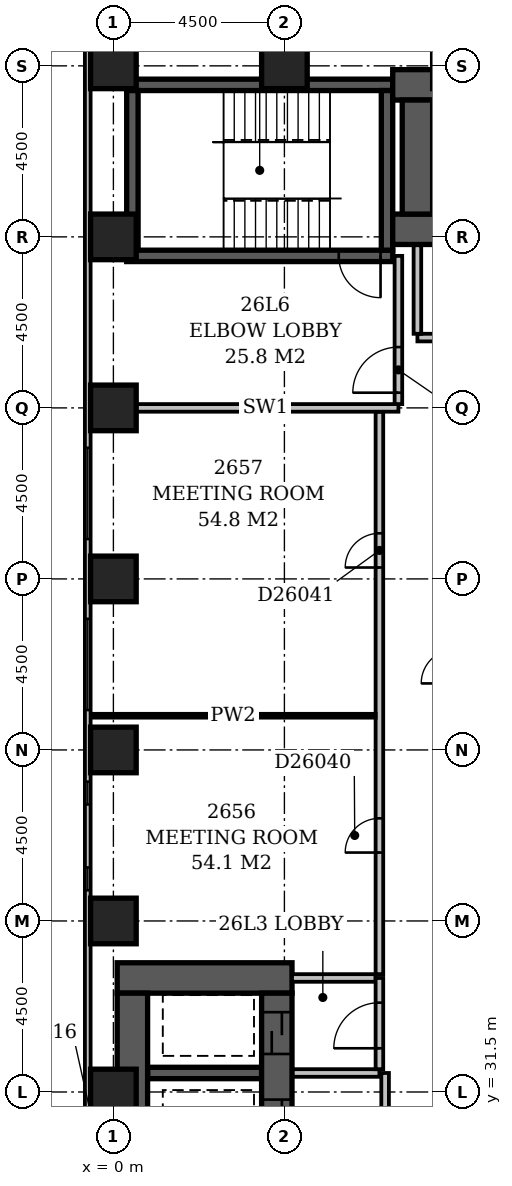
"""IFC4 building model, lengths in metres.
Left out: names, types, materials, properties, quantities, classifications, styles, units other than length and angle.
Written with IfcOpenShell. Run it as: python <this file> out.ifc"""

import sys

from ifc_helpers import new_model, si_unit, direction, frame, frame_2d, origin, origin_2d, place, context, subcontext, project, spatial, rectangle, extrude, element, fill, save


model = new_model("IFC4")
c1 = context("Model", 3, precision=1e-05, world=origin(), true_north=direction((0.0, 1.0)))
c2 = subcontext(c1, "Body", "Model", "MODEL_VIEW")
j1 = project(units=[si_unit("LENGTHUNIT", "METRE"), si_unit("PLANEANGLEUNIT", "RADIAN")], contexts=[c1])
p1 = place(None, origin())
s1 = spatial("IfcSite", under=j1, at=p1, CompositionType="ELEMENT")
p2 = place(p1, origin())
s2 = spatial("IfcBuilding", under=s1, at=p2, CompositionType="ELEMENT")
p3 = place(p2, frame((0.0, 0.0, 104.6)))
s3 = spatial("IfcBuildingStorey", under=s2, at=p3, CompositionType="ELEMENT", Elevation=104.6)
p4 = place(p3, frame((0.1, 34.5, -0.3), z_axis=(0.0, 0.0, 1.0), x_axis=(1.0, 0.0, 0.0)))
e1 = element("IfcWall", 1, at=p4, inside=s3, PredefinedType="SHEAR", context=c2, shape_type="SweptSolid", body=[
    extrude(rectangle(XDim=4.6, YDim=0.8, at=frame_2d((2.3, 0.0))), origin(), (0.0, 0.0, 1.0), 3.45),
])
p5 = place(p3, frame((0.35, 53.5, -0.3), z_axis=(0.0, 0.0, 1.0), x_axis=(1.0, 0.0, 0.0)))
e2 = element("IfcWall", 2, at=p5, inside=s3, PredefinedType="SHEAR", context=c2, shape_type="SweptSolid", body=[
    extrude(rectangle(XDim=7.0, YDim=0.3, at=frame_2d((3.5, 0.0))), origin(), (0.0, 0.0, 1.0), 3.45),
])
p6 = place(p5, frame((5.58, 0.0, 0.3)))
e3 = element("IfcOpeningElement", 3, at=p6, cuts=e2, PredefinedType="OPENING", context=c2, shape_type="SweptSolid", body=[
    extrude(rectangle(XDim=1.1, YDim=2.1, at=frame_2d((0.55, 1.05))), frame((0.0, 0.162, 0.0), z_axis=(0.0, -1.0, 0.0), x_axis=(1.0, 0.0, 0.0)), (0.0, 0.0, 1.0), 0.324),
])
p7 = place(p3, frame((0.35, 58.0, -0.3), z_axis=(0.0, 0.0, 1.0), x_axis=(1.0, 0.0, 0.0)))
e4 = element("IfcWall", 4, at=p7, inside=s3, PredefinedType="SHEAR", context=c2, shape_type="SweptSolid", body=[
    extrude(rectangle(XDim=7.0, YDim=0.3, at=frame_2d((3.5, 0.0))), origin(), (0.0, 0.0, 1.0), 3.45),
])
p8 = place(p3, frame((0.5, 27.15, -0.3), z_axis=(0.0, 0.0, 1.0), x_axis=(0.0, 1.0, 0.0)))
e5 = element("IfcWall", 5, at=p8, inside=s3, PredefinedType="SHEAR", context=c2, shape_type="SweptSolid", body=[
    extrude(rectangle(XDim=6.95, YDim=0.8, at=frame_2d((3.475, 0.0))), origin(), (0.0, 0.0, 1.0), 3.45),
])
p9 = place(p3, frame((0.5, 53.65, -0.3), z_axis=(0.0, 0.0, 1.0), x_axis=(0.0, 1.0, 0.0)))
e6 = element("IfcWall", 6, at=p9, inside=s3, PredefinedType="SHEAR", context=c2, shape_type="SweptSolid", body=[
    extrude(rectangle(XDim=4.2, YDim=0.3, at=frame_2d((2.1, 0.0))), origin(), (0.0, 0.0, 1.0), 3.45),
])
p10 = place(p3, frame((0.9, 32.0, -0.3), z_axis=(0.0, 0.0, 1.0), x_axis=(1.0, 0.0, 0.0)))
e7 = element("IfcWall", 7, at=p10, inside=s3, PredefinedType="SHEAR", context=c2, shape_type="SweptSolid", body=[
    extrude(rectangle(XDim=3.0, YDim=0.3, at=frame_2d((1.5, 0.0))), origin(), (0.0, 0.0, 1.0), 3.45),
])
p11 = place(p3, frame((4.3, 27.15, -0.3), z_axis=(0.0, 0.0, 1.0), x_axis=(0.0, 1.0, 0.0)))
e8 = element("IfcWall", 8, at=p11, inside=s3, PredefinedType="SHEAR", context=c2, shape_type="SweptSolid", body=[
    extrude(rectangle(XDim=6.95, YDim=0.8, at=frame_2d((3.475, 0.0))), origin(), (0.0, 0.0, 1.0), 3.45),
])
p12 = place(p11, frame((3.05, 0.0, 0.3)))
e9 = element("IfcOpeningElement", 9, at=p12, cuts=e8, PredefinedType="OPENING", context=c2, shape_type="SweptSolid", body=[
    extrude(rectangle(XDim=1.1, YDim=2.1, at=frame_2d((0.55, 1.05))), frame((0.0, 0.412, 0.0), z_axis=(0.0, -1.0, 0.0), x_axis=(1.0, 0.0, 0.0)), (0.0, 0.0, 1.0), 0.824),
])
p13 = place(p11, frame((0.55, 0.0, 0.3)))
e10 = element("IfcOpeningElement", 10, at=p13, cuts=e8, PredefinedType="OPENING", context=c2, shape_type="SweptSolid", body=[
    extrude(rectangle(XDim=1.1, YDim=2.1, at=frame_2d((0.55, 1.05))), frame((0.0, 0.412, 0.0), z_axis=(0.0, -1.0, 0.0), x_axis=(1.0, 0.0, 0.0)), (0.0, 0.0, 1.0), 0.824),
])
p14 = place(p11, frame((5.35, 0.0, 0.3)))
e11 = element("IfcOpeningElement", 11, at=p14, cuts=e8, PredefinedType="OPENING", context=c2, shape_type="SweptSolid", body=[
    extrude(rectangle(XDim=1.1, YDim=2.1, at=frame_2d((0.55, 1.05))), frame((0.0, 0.412, 0.0), z_axis=(0.0, -1.0, 0.0), x_axis=(1.0, 0.0, 0.0)), (0.0, 0.0, 1.0), 0.824),
])
p15 = place(p3, frame((7.2, 53.65, -0.3), z_axis=(0.0, 0.0, 1.0), x_axis=(0.0, 1.0, 0.0)))
e12 = element("IfcWall", 12, at=p15, inside=s3, PredefinedType="SHEAR", context=c2, shape_type="SweptSolid", body=[
    extrude(rectangle(XDim=4.2, YDim=0.3, at=frame_2d((2.1, 0.0))), origin(), (0.0, 0.0, 1.0), 3.45),
])
p16 = place(p3, frame((7.35, 54.2, -0.3), z_axis=(0.0, 0.0, 1.0), x_axis=(1.0, 0.0, 0.0)))
e13 = element("IfcWall", 13, at=p16, inside=s3, PredefinedType="SHEAR", context=c2, shape_type="SweptSolid", body=[
    extrude(rectangle(XDim=16.45, YDim=0.8, at=frame_2d((8.225, 0.0))), origin(), (0.0, 0.0, 1.0), 3.45),
])
p17 = place(p16, frame((1.35, 0.0, 0.3)))
e14 = element("IfcOpeningElement", 14, at=p17, cuts=e13, PredefinedType="OPENING", context=c2, shape_type="SweptSolid", body=[
    extrude(rectangle(XDim=1.1, YDim=2.1, at=frame_2d((0.55, 1.05))), frame((0.0, 0.412, 0.0), z_axis=(0.0, -1.0, 0.0), x_axis=(1.0, 0.0, 0.0)), (0.0, 0.0, 1.0), 0.824),
])
p18 = place(p16, frame((3.85, 0.0, 0.3)))
e15 = element("IfcOpeningElement", 15, at=p18, cuts=e13, PredefinedType="OPENING", context=c2, shape_type="SweptSolid", body=[
    extrude(rectangle(XDim=1.1, YDim=2.1, at=frame_2d((0.55, 1.05))), frame((0.0, 0.412, 0.0), z_axis=(0.0, -1.0, 0.0), x_axis=(1.0, 0.0, 0.0)), (0.0, 0.0, 1.0), 0.824),
])
p19 = place(p16, frame((6.35, 0.0, 0.3)))
e16 = element("IfcOpeningElement", 16, at=p19, cuts=e13, PredefinedType="OPENING", context=c2, shape_type="SweptSolid", body=[
    extrude(rectangle(XDim=1.1, YDim=2.1, at=frame_2d((0.55, 1.05))), frame((0.0, 0.412, 0.0), z_axis=(0.0, -1.0, 0.0), x_axis=(1.0, 0.0, 0.0)), (0.0, 0.0, 1.0), 0.824),
])
p20 = place(p16, frame((8.85, 0.0, 0.3)))
e17 = element("IfcOpeningElement", 17, at=p20, cuts=e13, PredefinedType="OPENING", context=c2, shape_type="SweptSolid", body=[
    extrude(rectangle(XDim=1.1, YDim=2.1, at=frame_2d((0.55, 1.05))), frame((0.0, 0.412, 0.0), z_axis=(0.0, -1.0, 0.0), x_axis=(1.0, 0.0, 0.0)), (0.0, 0.0, 1.0), 0.824),
])
p21 = place(p16, frame((11.35, 0.0, 0.3)))
e18 = element("IfcOpeningElement", 18, at=p21, cuts=e13, PredefinedType="OPENING", context=c2, shape_type="SweptSolid", body=[
    extrude(rectangle(XDim=1.1, YDim=2.1, at=frame_2d((0.55, 1.05))), frame((0.0, 0.412, 0.0), z_axis=(0.0, -1.0, 0.0), x_axis=(1.0, 0.0, 0.0)), (0.0, 0.0, 1.0), 0.824),
])
p22 = place(p16, frame((13.85, 0.0, 0.3)))
e19 = element("IfcOpeningElement", 19, at=p22, cuts=e13, PredefinedType="OPENING", context=c2, shape_type="SweptSolid", body=[
    extrude(rectangle(XDim=1.1, YDim=2.1, at=frame_2d((0.55, 1.05))), frame((0.0, 0.412, 0.0), z_axis=(0.0, -1.0, 0.0), x_axis=(1.0, 0.0, 0.0)), (0.0, 0.0, 1.0), 0.824),
])
p23 = place(p3, frame((7.35, 58.0, -0.3), z_axis=(0.0, 0.0, 1.0), x_axis=(1.0, 0.0, 0.0)))
e20 = element("IfcWall", 20, at=p23, inside=s3, PredefinedType="SHEAR", context=c2, shape_type="SweptSolid", body=[
    extrude(rectangle(XDim=16.45, YDim=0.8, at=frame_2d((8.225, 0.0))), origin(), (0.0, 0.0, 1.0), 3.45),
])
p24 = place(p3, frame((8.0, 54.6, -0.3), z_axis=(0.0, 0.0, 1.0), x_axis=(0.0, 1.0, 0.0)))
e21 = element("IfcWall", 21, at=p24, inside=s3, PredefinedType="SHEAR", context=c2, shape_type="SweptSolid", body=[
    extrude(rectangle(XDim=3.0, YDim=0.8, at=frame_2d((1.5, 0.0))), origin(), (0.0, 0.0, 1.0), 3.45),
])
for number, where, z_axis, x_axis in (
    (22, (0.0, 31.5, -0.3), (0.0, 0.0, 1.0), (1.0, 0.0, 0.0)),
    (23, (0.0, 36.0, -0.3), (0.0, 0.0, 1.0), (1.0, 0.0, 0.0)),
    (24, (0.0, 40.5, -0.3), (0.0, 0.0, 1.0), (1.0, 0.0, 0.0)),
    (25, (0.0, 45.0, -0.3), (0.0, 0.0, 1.0), (1.0, 0.0, 0.0)),
    (26, (0.0, 49.5, -0.3), (0.0, 0.0, 1.0), (1.0, 0.0, 0.0)),
    (27, (0.0, 54.0, -0.3), (0.0, 0.0, 1.0), (1.0, 0.0, 0.0)),
    (28, (0.0, 58.5, -0.3), (0.0, 0.0, 1.0), (1.0, 0.0, 0.0)),
    (29, (4.5, 58.5, -0.3), (0.0, 0.0, 1.0), (1.0, 0.0, 0.0)),
):
    element("IfcColumn", number, at=place(p3, frame(where, z_axis=z_axis, x_axis=x_axis)), inside=s3, PredefinedType="COLUMN", context=c2, shape_type="SweptSolid", body=[
        extrude(rectangle(XDim=1.2, YDim=1.2, at=origin_2d()), origin(), (0.0, 0.0, 1.0), 3.45),
    ])
p25 = place(p3, frame((-0.675, 59.1, 0.0), z_axis=(0.0, 0.0, 1.0), x_axis=(0.0, -1.0, 0.0)))
e30 = element("IfcWall", 30, at=p25, inside=s3, PredefinedType="STANDARD", context=c2, shape_type="SweptSolid", body=[
    extrude(rectangle(XDim=55.35, YDim=0.15, at=frame_2d((27.675, 0.0))), origin(), (0.0, 0.0, 1.0), 2.5),
])
p26 = place(p25, frame((10.65, 0.0, 0.6)))
e31 = element("IfcOpeningElement", 31, at=p26, cuts=e30, PredefinedType="OPENING", context=c2, shape_type="SweptSolid", body=[
    extrude(rectangle(XDim=2.4, YDim=1.8, at=frame_2d((1.2, 0.9))), frame((0.0, 0.087, 0.0), z_axis=(0.0, -1.0, 0.0), x_axis=(1.0, 0.0, 0.0)), (0.0, 0.0, 1.0), 0.174),
])
p27 = place(p25, frame((15.15, 0.0, 0.6)))
e32 = element("IfcOpeningElement", 32, at=p27, cuts=e30, PredefinedType="OPENING", context=c2, shape_type="SweptSolid", body=[
    extrude(rectangle(XDim=2.4, YDim=1.8, at=frame_2d((1.2, 0.9))), frame((0.0, 0.087, 0.0), z_axis=(0.0, -1.0, 0.0), x_axis=(1.0, 0.0, 0.0)), (0.0, 0.0, 1.0), 0.174),
])
p28 = place(p25, frame((19.434, 0.0, 0.6)))
e33 = element("IfcOpeningElement", 33, at=p28, cuts=e30, PredefinedType="OPENING", context=c2, shape_type="SweptSolid", body=[
    extrude(rectangle(XDim=0.6, YDim=1.8, at=frame_2d((0.3, 0.9))), frame((0.0, 0.087, 0.0), z_axis=(0.0, -1.0, 0.0), x_axis=(1.0, 0.0, 0.0)), (0.0, 0.0, 1.0), 0.174),
])
p29 = place(p25, frame((21.692, 0.0, 0.6)))
e34 = element("IfcOpeningElement", 34, at=p29, cuts=e30, PredefinedType="OPENING", context=c2, shape_type="SweptSolid", body=[
    extrude(rectangle(XDim=0.6, YDim=1.8, at=frame_2d((0.3, 0.9))), frame((0.0, 0.087, 0.0), z_axis=(0.0, -1.0, 0.0), x_axis=(1.0, 0.0, 0.0)), (0.0, 0.0, 1.0), 0.174),
])
p30 = place(p3, frame((8.0, 51.35, 0.0), z_axis=(0.0, 0.0, 1.0), x_axis=(1.0, 0.0, 0.0)))
e35 = element("IfcWall", 35, at=p30, inside=s3, PredefinedType="PARTITIONING", context=c2, shape_type="SweptSolid", body=[
    extrude(rectangle(XDim=15.0, YDim=0.2, at=frame_2d((7.5, 0.0))), origin(), (0.0, 0.0, 1.0), 3.15),
])
p31 = place(p30, frame((3.4, 0.0, 0.0)))
e36 = element("IfcOpeningElement", 36, at=p31, cuts=e35, PredefinedType="OPENING", context=c2, shape_type="SweptSolid", body=[
    extrude(rectangle(XDim=1.2, YDim=2.1, at=frame_2d((0.6, 1.05))), frame((0.0, 0.112, 0.0), z_axis=(0.0, -1.0, 0.0), x_axis=(1.0, 0.0, 0.0)), (0.0, 0.0, 1.0), 0.224),
])
p32 = place(p30, frame((9.4, 0.0, 0.0)))
e37 = element("IfcOpeningElement", 37, at=p32, cuts=e35, PredefinedType="OPENING", context=c2, shape_type="SweptSolid", body=[
    extrude(rectangle(XDim=1.2, YDim=2.1, at=frame_2d((0.6, 1.05))), frame((0.0, 0.112, 0.0), z_axis=(0.0, -1.0, 0.0), x_axis=(1.0, 0.0, 0.0)), (0.0, 0.0, 1.0), 0.224),
])
p33 = place(p3, frame((8.0, 51.45, 0.0), z_axis=(0.0, 0.0, 1.0), x_axis=(0.0, 1.0, 0.0)))
e38 = element("IfcWall", 38, at=p33, inside=s3, PredefinedType="PARTITIONING", context=c2, shape_type="SweptSolid", body=[
    extrude(rectangle(XDim=2.33, YDim=0.2, at=frame_2d((1.165, 0.0))), origin(), (0.0, 0.0, 1.0), 3.15),
])
p34 = place(p3, frame((4.72, 32.0, 0.0), z_axis=(0.0, 0.0, 1.0), x_axis=(1.0, 0.0, 0.0)))
e39 = element("IfcWall", 39, at=p34, inside=s3, PredefinedType="PARTITIONING", context=c2, shape_type="SweptSolid", body=[
    extrude(rectangle(XDim=2.28, YDim=0.2, at=frame_2d((1.14, 0.0))), origin(), (0.0, 0.0, 1.0), 3.15),
])
p35 = place(p3, frame((7.0, 32.1, 0.0), z_axis=(0.0, 0.0, 1.0), x_axis=(0.0, 1.0, 0.0)))
e40 = element("IfcWall", 40, at=p35, inside=s3, PredefinedType="PARTITIONING", context=c2, shape_type="SweptSolid", body=[
    extrude(rectangle(XDim=2.4, YDim=0.2, at=frame_2d((1.2, 0.0))), origin(), (0.0, 0.0, 1.0), 3.15),
])
p36 = place(p35, frame((0.55, 0.0, 0.0)))
e41 = element("IfcOpeningElement", 41, at=p36, cuts=e40, PredefinedType="OPENING", context=c2, shape_type="SweptSolid", body=[
    extrude(rectangle(XDim=1.2, YDim=2.1, at=frame_2d((0.6, 1.05))), frame((0.0, 0.112, 0.0), z_axis=(0.0, -1.0, 0.0), x_axis=(1.0, 0.0, 0.0)), (0.0, 0.0, 1.0), 0.224),
])
p37 = place(p3, frame((4.7, 34.5, 0.0), z_axis=(0.0, 0.0, 1.0), x_axis=(1.0, 0.0, 0.0)))
e42 = element("IfcWall", 42, at=p37, inside=s3, PredefinedType="PARTITIONING", context=c2, shape_type="SweptSolid", body=[
    extrude(rectangle(XDim=2.2, YDim=0.2, at=frame_2d((1.1, 0.0))), origin(), (0.0, 0.0, 1.0), 3.15),
])
p38 = place(p3, frame((7.15, 27.17, 0.0), z_axis=(0.0, 0.0, 1.0), x_axis=(0.0, 1.0, 0.0)))
e43 = element("IfcWall", 43, at=p38, inside=s3, PredefinedType="PARTITIONING", context=c2, shape_type="SweptSolid", body=[
    extrude(rectangle(XDim=4.83, YDim=0.2, at=frame_2d((2.415, 0.0))), origin(), (0.0, 0.0, 1.0), 3.15),
])
p39 = place(p38, frame((1.73, 0.0, 0.0)))
e44 = element("IfcOpeningElement", 44, at=p39, cuts=e43, PredefinedType="OPENING", context=c2, shape_type="SweptSolid", body=[
    extrude(rectangle(XDim=1.2, YDim=2.1, at=frame_2d((0.6, 1.05))), frame((0.0, 0.112, 0.0), z_axis=(0.0, -1.0, 0.0), x_axis=(1.0, 0.0, 0.0)), (0.0, 0.0, 1.0), 0.224),
])
p40 = place(p3, frame((0.5, 49.5, 0.0), z_axis=(0.0, 0.0, 1.0), x_axis=(1.0, 0.0, 0.0)))
e45 = element("IfcWall", 45, at=p40, inside=s3, PredefinedType="PARTITIONING", context=c2, shape_type="SweptSolid", body=[
    extrude(rectangle(XDim=7.0, YDim=0.2, at=frame_2d((3.5, 0.0))), origin(), (0.0, 0.0, 1.0), 3.15),
])
p41 = place(p3, frame((7.5, 49.6, 0.0), z_axis=(0.0, 0.0, 1.0), x_axis=(0.0, 1.0, 0.0)))
e46 = element("IfcWall", 46, at=p41, inside=s3, PredefinedType="PARTITIONING", context=c2, shape_type="SweptSolid", body=[
    extrude(rectangle(XDim=3.9, YDim=0.2, at=frame_2d((1.95, 0.0))), origin(), (0.0, 0.0, 1.0), 3.15),
])
p42 = place(p41, frame((0.3, 0.0, 0.0)))
e47 = element("IfcOpeningElement", 47, at=p42, cuts=e46, PredefinedType="OPENING", context=c2, shape_type="SweptSolid", body=[
    extrude(rectangle(XDim=1.2, YDim=2.1, at=frame_2d((0.6, 1.05))), frame((0.0, 0.112, 0.0), z_axis=(0.0, -1.0, 0.0), x_axis=(1.0, 0.0, 0.0)), (0.0, 0.0, 1.0), 0.224),
])
p43 = place(p3, frame((7.0, 34.6, 0.0), z_axis=(0.0, 0.0, 1.0), x_axis=(0.0, 1.0, 0.0)))
e48 = element("IfcWall", 48, at=p43, inside=s3, PredefinedType="PARTITIONING", context=c2, shape_type="SweptSolid", body=[
    extrude(rectangle(XDim=14.8, YDim=0.2, at=frame_2d((7.4, 0.0))), origin(), (0.0, 0.0, 1.0), 3.15),
])
p44 = place(p43, frame((3.2, 0.0, 0.0)))
e49 = element("IfcOpeningElement", 49, at=p44, cuts=e48, PredefinedType="OPENING", context=c2, shape_type="SweptSolid", body=[
    extrude(rectangle(XDim=0.9, YDim=2.1, at=frame_2d((0.45, 1.05))), frame((0.0, 0.112, 0.0), z_axis=(0.0, -1.0, 0.0), x_axis=(1.0, 0.0, 0.0)), (0.0, 0.0, 1.0), 0.224),
])
p45 = place(p43, frame((10.7, 0.0, 0.0)))
e50 = element("IfcOpeningElement", 50, at=p45, cuts=e48, PredefinedType="OPENING", context=c2, shape_type="SweptSolid", body=[
    extrude(rectangle(XDim=0.9, YDim=2.1, at=frame_2d((0.45, 1.05))), frame((0.0, 0.112, 0.0), z_axis=(0.0, -1.0, 0.0), x_axis=(1.0, 0.0, 0.0)), (0.0, 0.0, 1.0), 0.224),
])
p46 = place(p3, frame((-0.6, 41.4, 0.0), z_axis=(0.0, 0.0, 1.0), x_axis=(1.0, 0.0, 0.0)))
e51 = element("IfcWall", 51, at=p46, inside=s3, PredefinedType="PARTITIONING", context=c2, shape_type="SweptSolid", body=[
    extrude(rectangle(XDim=7.5, YDim=0.1, at=frame_2d((3.75, 0.0))), origin(), (0.0, 0.0, 1.0), 3.15),
])
p47 = place(p26, origin())
e52 = element("IfcWindow", 52, at=p47, inside=s3, PartitioningType="SINGLE_PANEL", PredefinedType="WINDOW", context=c2, shape_type="SweptSolid", body=[
    extrude(rectangle(XDim=2.4, YDim=1.8, at=frame_2d((1.2, 0.9))), frame((0.0, 0.03, 0.0), z_axis=(0.0, -1.0, 0.0), x_axis=(1.0, 0.0, 0.0)), (0.0, 0.0, 1.0), 0.06),
])
fill(e31, e52)
p48 = place(p27, origin())
e53 = element("IfcWindow", 53, at=p48, inside=s3, PartitioningType="SINGLE_PANEL", PredefinedType="WINDOW", context=c2, shape_type="SweptSolid", body=[
    extrude(rectangle(XDim=2.4, YDim=1.8, at=frame_2d((1.2, 0.9))), frame((0.0, 0.03, 0.0), z_axis=(0.0, -1.0, 0.0), x_axis=(1.0, 0.0, 0.0)), (0.0, 0.0, 1.0), 0.06),
])
fill(e32, e53)
p49 = place(p28, origin())
e54 = element("IfcWindow", 54, at=p49, inside=s3, PartitioningType="SINGLE_PANEL", PredefinedType="WINDOW", context=c2, shape_type="SweptSolid", body=[
    extrude(rectangle(XDim=0.6, YDim=1.8, at=frame_2d((0.3, 0.9))), frame((0.0, 0.03, 0.0), z_axis=(0.0, -1.0, 0.0), x_axis=(1.0, 0.0, 0.0)), (0.0, 0.0, 1.0), 0.06),
])
fill(e33, e54)
p50 = place(p29, origin())
e55 = element("IfcWindow", 55, at=p50, inside=s3, PartitioningType="SINGLE_PANEL", PredefinedType="WINDOW", context=c2, shape_type="SweptSolid", body=[
    extrude(rectangle(XDim=0.6, YDim=1.8, at=frame_2d((0.3, 0.9))), frame((0.0, 0.03, 0.0), z_axis=(0.0, -1.0, 0.0), x_axis=(1.0, 0.0, 0.0)), (0.0, 0.0, 1.0), 0.06),
])
fill(e34, e55)
p51 = place(p42, origin())
e56 = element("IfcDoor", 56, at=p51, inside=s3, OperationType="SINGLE_SWING_LEFT", PredefinedType="DOOR", context=c2, shape_type="SweptSolid", body=[
    extrude(rectangle(XDim=1.2, YDim=2.1, at=frame_2d((0.6, 1.05))), frame((0.0, 0.025, 0.0), z_axis=(0.0, -1.0, 0.0), x_axis=(1.0, 0.0, 0.0)), (0.0, 0.0, 1.0), 0.05),
])
fill(e47, e56)
p52 = place(p12, origin())
e57 = element("IfcDoor", 57, at=p52, inside=s3, OperationType="SLIDING_TO_LEFT", PredefinedType="DOOR", context=c2, shape_type="SweptSolid", body=[
    extrude(rectangle(XDim=1.1, YDim=2.1, at=frame_2d((0.55, 1.05))), frame((0.0, 0.025, 0.0), z_axis=(0.0, -1.0, 0.0), x_axis=(1.0, 0.0, 0.0)), (0.0, 0.0, 1.0), 0.05),
])
fill(e9, e57)
p53 = place(p36, origin())
e58 = element("IfcDoor", 58, at=p53, inside=s3, OperationType="SINGLE_SWING_LEFT", PredefinedType="DOOR", context=c2, shape_type="SweptSolid", body=[
    extrude(rectangle(XDim=1.2, YDim=2.1, at=frame_2d((0.6, 1.05))), frame((0.0, 0.025, 0.0), z_axis=(0.0, -1.0, 0.0), x_axis=(1.0, 0.0, 0.0)), (0.0, 0.0, 1.0), 0.05),
])
fill(e41, e58)
p54 = place(p14, origin())
e59 = element("IfcDoor", 59, at=p54, inside=s3, OperationType="SLIDING_TO_LEFT", PredefinedType="DOOR", context=c2, shape_type="SweptSolid", body=[
    extrude(rectangle(XDim=1.1, YDim=2.1, at=frame_2d((0.55, 1.05))), frame((0.0, 0.025, 0.0), z_axis=(0.0, -1.0, 0.0), x_axis=(1.0, 0.0, 0.0)), (0.0, 0.0, 1.0), 0.05),
])
fill(e11, e59)
p55 = place(p6, origin())
e60 = element("IfcDoor", 60, at=p55, inside=s3, OperationType="SINGLE_SWING_RIGHT", PredefinedType="DOOR", context=c2, shape_type="SweptSolid", body=[
    extrude(rectangle(XDim=1.1, YDim=2.1, at=frame_2d((0.55, 1.05))), frame((0.0, 0.025, 0.0), z_axis=(0.0, -1.0, 0.0), x_axis=(1.0, 0.0, 0.0)), (0.0, 0.0, 1.0), 0.05),
])
fill(e3, e60)
p56 = place(p44, origin())
e61 = element("IfcDoor", 61, at=p56, inside=s3, OperationType="SINGLE_SWING_LEFT", PredefinedType="DOOR", context=c2, shape_type="SweptSolid", body=[
    extrude(rectangle(XDim=0.9, YDim=2.1, at=frame_2d((0.45, 1.05))), frame((0.0, 0.025, 0.0), z_axis=(0.0, -1.0, 0.0), x_axis=(1.0, 0.0, 0.0)), (0.0, 0.0, 1.0), 0.05),
])
fill(e49, e61)
p57 = place(p45, origin())
e62 = element("IfcDoor", 62, at=p57, inside=s3, OperationType="SINGLE_SWING_LEFT", PredefinedType="DOOR", context=c2, shape_type="SweptSolid", body=[
    extrude(rectangle(XDim=0.9, YDim=2.1, at=frame_2d((0.45, 1.05))), frame((0.0, 0.025, 0.0), z_axis=(0.0, -1.0, 0.0), x_axis=(1.0, 0.0, 0.0)), (0.0, 0.0, 1.0), 0.05),
])
fill(e50, e62)
save(model, sys.argv[1])
